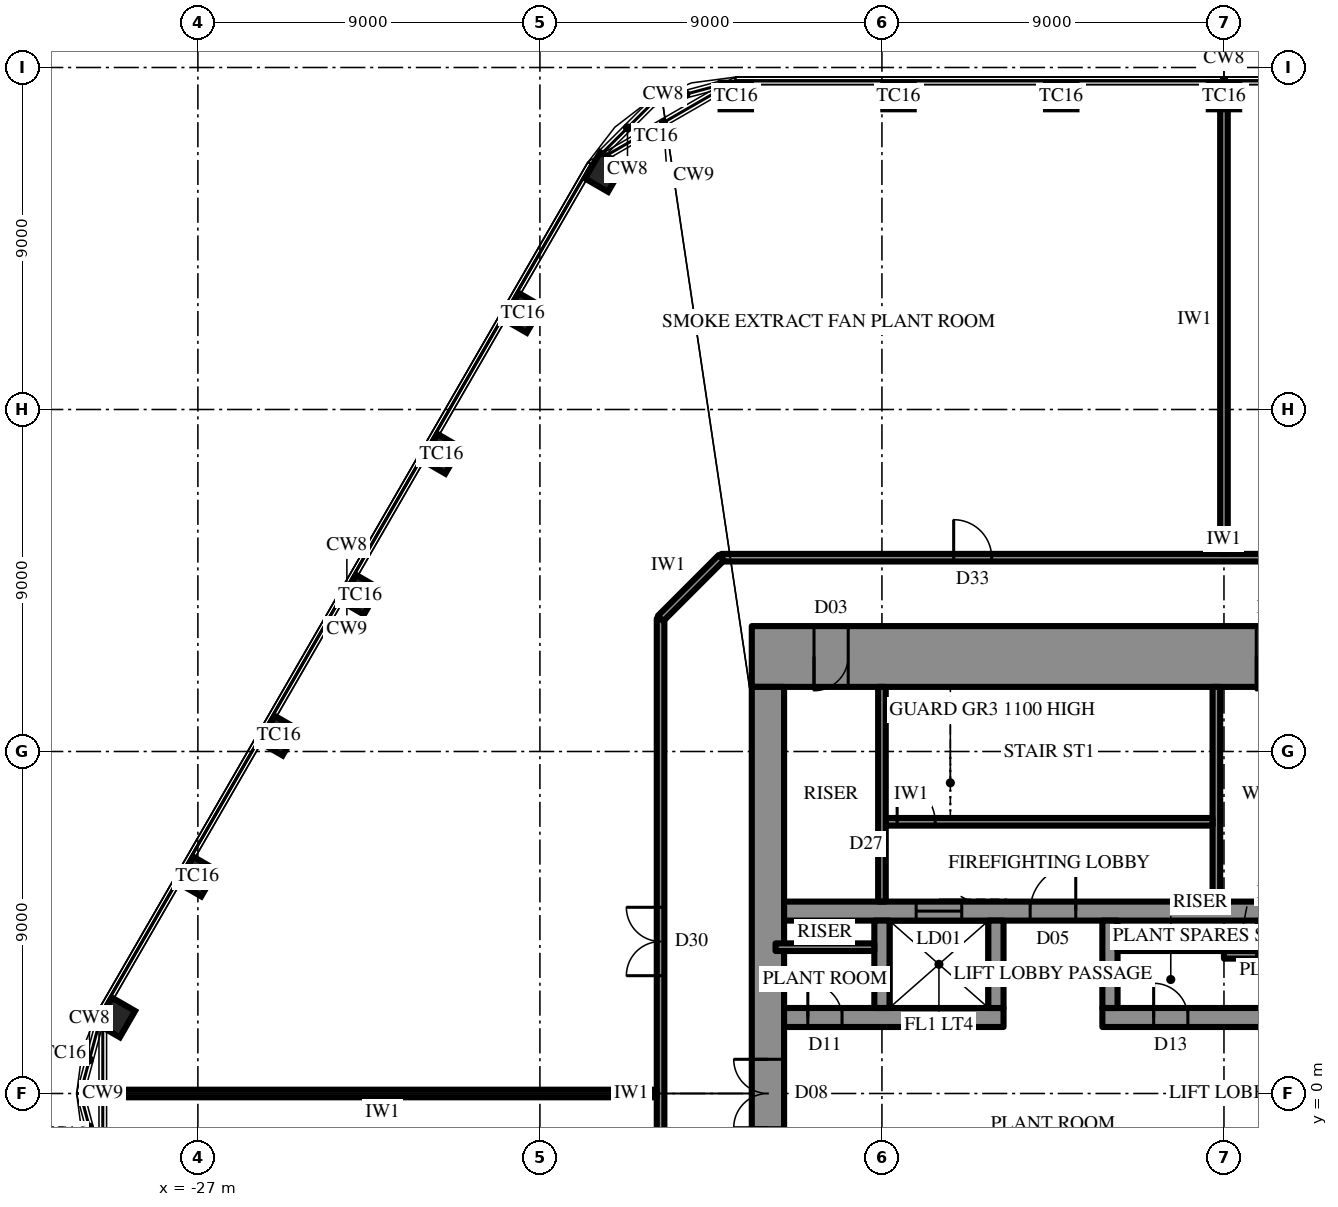
"""IFC4 building model, lengths in metres.
Left out: names, types, materials, properties, quantities, classifications, styles, units other than length and angle.
Written with IfcOpenShell. Run it as: python <this file> out.ifc"""

import sys

from ifc_helpers import new_model, si_unit, direction, frame, frame_2d, origin, origin_2d, place, context, subcontext, project, spatial, rectangle, extrude, element, fill, save


model = new_model("IFC4")
c1 = context("Model", 3, precision=1e-05, world=origin(), true_north=direction((0.0, 1.0)))
c2 = subcontext(c1, "Body", "Model", "MODEL_VIEW")
j1 = project(units=[si_unit("LENGTHUNIT", "METRE"), si_unit("PLANEANGLEUNIT", "RADIAN")], contexts=[c1])
p1 = place(None, origin())
s1 = spatial("IfcSite", under=j1, at=p1, CompositionType="ELEMENT")
p2 = place(p1, origin())
s2 = spatial("IfcBuilding", under=s1, at=p2, CompositionType="ELEMENT")
p3 = place(p2, frame((0.0, 0.0, 402.3)))
s3 = spatial("IfcBuildingStorey", under=s2, at=p3, CompositionType="ELEMENT", Elevation=402.3)
for number, where, z_axis, x_axis in (
    (1, (0.0, 26.25, 0.0), (0.0, 0.0, 1.0), (-1.0, 0.0, 0.0)),
    (2, (-4.282, 26.25, 0.0), (0.0, 0.0, 1.0), (-1.0, 0.0, 0.0)),
    (3, (-8.564, 26.25, 0.0), (0.0, 0.0, 1.0), (-1.0, 0.0, 0.0)),
    (4, (-12.846, 26.25, 0.0), (0.0, 0.0, 1.0), (-1.0, 0.0, 0.0)),
    (5, (-16.31, 24.25, 0.0), (0.0, 0.0, 1.0), (-0.5, -0.866, 0.0)),
    (6, (-18.451, 20.542, 0.0), (0.0, 0.0, 1.0), (-0.5, -0.866, 0.0)),
    (7, (-20.592, 16.833, 0.0), (0.0, 0.0, 1.0), (-0.5, -0.866, 0.0)),
    (8, (-22.733, 13.125, 0.0), (0.0, 0.0, 1.0), (-0.5, -0.866, 0.0)),
    (9, (-24.874, 9.417, 0.0), (0.0, 0.0, 1.0), (-0.5, -0.866, 0.0)),
    (10, (-27.015, 5.708, 0.0), (0.0, 0.0, 1.0), (-0.5, -0.866, 0.0)),
    (11, (-29.156, 2.0, 0.0), (0.0, 0.0, 1.0), (-0.5, -0.866, 0.0)),
):
    element("IfcColumn", number, at=place(p3, frame(where, z_axis=z_axis, x_axis=x_axis)), inside=s3, PredefinedType="COLUMN", context=c2, shape_type="SweptSolid", body=[
        extrude(rectangle(XDim=0.8, YDim=0.7, at=origin_2d()), origin(), (0.0, 0.0, 1.0), 6.0),
    ])
p4 = place(p3, frame((-12.425, 11.5, 0.0), z_axis=(0.0, 0.0, 1.0), x_axis=(1.0, 0.0, 0.0)))
e12 = element("IfcWall", 12, at=p4, inside=s3, PredefinedType="SHEAR", context=c2, shape_type="SweptSolid", body=[
    extrude(rectangle(XDim=24.85, YDim=1.6, at=frame_2d((12.425, 0.0))), origin(), (0.0, 0.0, 1.0), 6.0),
])
p5 = place(p4, frame((13.275, 0.0, 0.0)))
e13 = element("IfcOpeningElement", 13, at=p5, cuts=e12, PredefinedType="OPENING", context=c2, shape_type="SweptSolid", body=[
    extrude(rectangle(XDim=0.9, YDim=2.2, at=frame_2d((0.45, 1.1))), frame((0.0, 0.81, 0.0), z_axis=(0.0, -1.0, 0.0), x_axis=(1.0, 0.0, 0.0)), (0.0, 0.0, 1.0), 1.62),
])
p6 = place(p4, frame((16.275, 0.0, 0.0)))
e14 = element("IfcOpeningElement", 14, at=p6, cuts=e12, PredefinedType="OPENING", context=c2, shape_type="SweptSolid", body=[
    extrude(rectangle(XDim=0.9, YDim=2.2, at=frame_2d((0.45, 1.1))), frame((0.0, 0.81, 0.0), z_axis=(0.0, -1.0, 0.0), x_axis=(1.0, 0.0, 0.0)), (0.0, 0.0, 1.0), 1.62),
])
p7 = place(p4, frame((19.325, 0.0, 0.0)))
e15 = element("IfcOpeningElement", 15, at=p7, cuts=e12, PredefinedType="OPENING", context=c2, shape_type="SweptSolid", body=[
    extrude(rectangle(XDim=1.0, YDim=2.2, at=frame_2d((0.5, 1.1))), frame((0.0, 0.81, 0.0), z_axis=(0.0, -1.0, 0.0), x_axis=(1.0, 0.0, 0.0)), (0.0, 0.0, 1.0), 1.62),
])
p8 = place(p4, frame((1.637, 0.0, 0.0)))
e16 = element("IfcOpeningElement", 16, at=p8, cuts=e12, PredefinedType="OPENING", context=c2, shape_type="SweptSolid", body=[
    extrude(rectangle(XDim=0.9, YDim=2.2, at=frame_2d((0.45, 1.1))), frame((0.0, 0.81, 0.0), z_axis=(0.0, -1.0, 0.0), x_axis=(1.0, 0.0, 0.0)), (0.0, 0.0, 1.0), 1.62),
])
p9 = place(p4, frame((22.312, 0.0, 0.0)))
e17 = element("IfcOpeningElement", 17, at=p9, cuts=e12, PredefinedType="OPENING", context=c2, shape_type="SweptSolid", body=[
    extrude(rectangle(XDim=0.9, YDim=2.2, at=frame_2d((0.45, 1.1))), frame((0.0, 0.81, 0.0), z_axis=(0.0, -1.0, 0.0), x_axis=(1.0, 0.0, 0.0)), (0.0, 0.0, 1.0), 1.62),
])
p10 = place(p3, frame((-12.0, 10.7, 0.0), z_axis=(0.0, 0.0, 1.0), x_axis=(0.0, -1.0, 0.0)))
e18 = element("IfcWall", 18, at=p10, inside=s3, PredefinedType="SHEAR", context=c2, shape_type="SweptSolid", body=[
    extrude(rectangle(XDim=21.4, YDim=0.85, at=frame_2d((10.7, 0.0))), origin(), (0.0, 0.0, 1.0), 6.0),
])
p11 = place(p10, frame((9.8, 0.0, 0.0)))
e19 = element("IfcOpeningElement", 19, at=p11, cuts=e18, PredefinedType="OPENING", context=c2, shape_type="SweptSolid", body=[
    extrude(rectangle(XDim=1.8, YDim=2.4, at=frame_2d((0.9, 1.2))), frame((0.0, 0.435, 0.0), z_axis=(0.0, -1.0, 0.0), x_axis=(1.0, 0.0, 0.0)), (0.0, 0.0, 1.0), 0.87),
])
p12 = place(p3, frame((-11.575, 2.0, 0.0), z_axis=(0.0, 0.0, 1.0), x_axis=(1.0, 0.0, 0.0)))
e20 = element("IfcWall", 20, at=p12, inside=s3, PredefinedType="SHEAR", context=c2, shape_type="SweptSolid", body=[
    extrude(rectangle(XDim=5.775, YDim=0.5, at=frame_2d((2.887, 0.0))), origin(), (0.0, 0.0, 1.0), 6.0),
])
p13 = place(p12, frame((0.625, 0.0, 0.0)))
e21 = element("IfcOpeningElement", 21, at=p13, cuts=e20, PredefinedType="OPENING", context=c2, shape_type="SweptSolid", body=[
    extrude(rectangle(XDim=0.9, YDim=2.2, at=frame_2d((0.45, 1.1))), frame((0.0, 0.26, 0.0), z_axis=(0.0, -1.0, 0.0), x_axis=(1.0, 0.0, 0.0)), (0.0, 0.0, 1.0), 0.52),
])
p14 = place(p3, frame((-3.2, 2.0, 0.0), z_axis=(0.0, 0.0, 1.0), x_axis=(1.0, 0.0, 0.0)))
e22 = element("IfcWall", 22, at=p14, inside=s3, PredefinedType="SHEAR", context=c2, shape_type="SweptSolid", body=[
    extrude(rectangle(XDim=14.775, YDim=0.5, at=frame_2d((7.387, 0.0))), origin(), (0.0, 0.0, 1.0), 6.0),
])
p15 = place(p14, frame((1.35, 0.0, 0.0)))
e23 = element("IfcOpeningElement", 23, at=p15, cuts=e22, PredefinedType="OPENING", context=c2, shape_type="SweptSolid", body=[
    extrude(rectangle(XDim=0.9, YDim=2.2, at=frame_2d((0.45, 1.1))), frame((0.0, 0.26, 0.0), z_axis=(0.0, -1.0, 0.0), x_axis=(1.0, 0.0, 0.0)), (0.0, 0.0, 1.0), 0.52),
])
p16 = place(p14, frame((4.25, 0.0, 0.0)))
e24 = element("IfcOpeningElement", 24, at=p16, cuts=e22, PredefinedType="OPENING", context=c2, shape_type="SweptSolid", body=[
    extrude(rectangle(XDim=0.9, YDim=2.2, at=frame_2d((0.45, 1.1))), frame((0.0, 0.26, 0.0), z_axis=(0.0, -1.0, 0.0), x_axis=(1.0, 0.0, 0.0)), (0.0, 0.0, 1.0), 0.52),
])
p17 = place(p14, frame((7.25, 0.0, 0.0)))
e25 = element("IfcOpeningElement", 25, at=p17, cuts=e22, PredefinedType="OPENING", context=c2, shape_type="SweptSolid", body=[
    extrude(rectangle(XDim=0.9, YDim=2.2, at=frame_2d((0.45, 1.1))), frame((0.0, 0.26, 0.0), z_axis=(0.0, -1.0, 0.0), x_axis=(1.0, 0.0, 0.0)), (0.0, 0.0, 1.0), 0.52),
])
p18 = place(p14, frame((10.15, 0.0, 0.0)))
e26 = element("IfcOpeningElement", 26, at=p18, cuts=e22, PredefinedType="OPENING", context=c2, shape_type="SweptSolid", body=[
    extrude(rectangle(XDim=0.9, YDim=2.2, at=frame_2d((0.45, 1.1))), frame((0.0, 0.26, 0.0), z_axis=(0.0, -1.0, 0.0), x_axis=(1.0, 0.0, 0.0)), (0.0, 0.0, 1.0), 0.52),
])
p19 = place(p14, frame((13.25, 0.0, 0.0)))
e27 = element("IfcOpeningElement", 27, at=p19, cuts=e22, PredefinedType="OPENING", context=c2, shape_type="SweptSolid", body=[
    extrude(rectangle(XDim=0.9, YDim=2.2, at=frame_2d((0.45, 1.1))), frame((0.0, 0.26, 0.0), z_axis=(0.0, -1.0, 0.0), x_axis=(1.0, 0.0, 0.0)), (0.0, 0.0, 1.0), 0.52),
])
p20 = place(p3, frame((-11.575, 4.8, 0.0), z_axis=(0.0, 0.0, 1.0), x_axis=(1.0, 0.0, 0.0)))
e28 = element("IfcWall", 28, at=p20, inside=s3, PredefinedType="SHEAR", context=c2, shape_type="SweptSolid", body=[
    extrude(rectangle(XDim=23.15, YDim=0.5, at=frame_2d((11.575, 0.0))), origin(), (0.0, 0.0, 1.0), 6.0),
])
p21 = place(p20, frame((6.475, 0.0, 0.0)))
e29 = element("IfcOpeningElement", 29, at=p21, cuts=e28, PredefinedType="OPENING", context=c2, shape_type="SweptSolid", body=[
    extrude(rectangle(XDim=1.2, YDim=2.2, at=frame_2d((0.6, 1.1))), frame((0.0, 0.26, 0.0), z_axis=(0.0, -1.0, 0.0), x_axis=(1.0, 0.0, 0.0)), (0.0, 0.0, 1.0), 0.52),
])
p22 = place(p20, frame((3.475, 0.0, 0.0)))
e30 = element("IfcOpeningElement", 30, at=p22, cuts=e28, PredefinedType="OPENING", context=c2, shape_type="SweptSolid", body=[
    extrude(rectangle(XDim=1.2, YDim=2.2, at=frame_2d((0.6, 1.1))), frame((0.0, 0.26, 0.0), z_axis=(0.0, -1.0, 0.0), x_axis=(1.0, 0.0, 0.0)), (0.0, 0.0, 1.0), 0.52),
])
for number, where, z_axis, x_axis in (
    (31, (-9.0, 2.25, 0.0), (0.0, 0.0, 1.0), (0.0, 1.0, 0.0)),
    (32, (-6.0, 2.25, 0.0), (0.0, 0.0, 1.0), (0.0, 1.0, 0.0)),
    (33, (-3.0, 2.25, 0.0), (0.0, 0.0, 1.0), (0.0, 1.0, 0.0)),
):
    element("IfcWall", number, at=place(p3, frame(where, z_axis=z_axis, x_axis=x_axis)), inside=s3, PredefinedType="SHEAR", context=c2, shape_type="SweptSolid", body=[
        extrude(rectangle(XDim=2.3, YDim=0.4, at=frame_2d((1.15, 0.0))), origin(), (0.0, 0.0, 1.0), 6.0),
    ])
p23 = place(p3, frame((-0.2, 5.05, 0.0), z_axis=(0.0, 0.0, 1.0), x_axis=(0.0, 1.0, 0.0)))
e34 = element("IfcWall", 34, at=p23, inside=s3, PredefinedType="SHEAR", context=c2, shape_type="SweptSolid", body=[
    extrude(rectangle(XDim=5.65, YDim=0.2, at=frame_2d((2.825, 0.0))), origin(), (0.0, 0.0, 1.0), 6.0),
])
p24 = place(p3, frame((-8.9, 7.15, 0.0), z_axis=(0.0, 0.0, 1.0), x_axis=(1.0, 0.0, 0.0)))
e35 = element("IfcWall", 35, at=p24, inside=s3, PredefinedType="SHEAR", context=c2, shape_type="SweptSolid", body=[
    extrude(rectangle(XDim=8.6, YDim=0.2, at=frame_2d((4.3, 0.0))), origin(), (0.0, 0.0, 1.0), 6.0),
])
p25 = place(p24, frame((0.3, 0.0, 0.0)))
e36 = element("IfcOpeningElement", 36, at=p25, cuts=e35, PredefinedType="OPENING", context=c2, shape_type="SweptSolid", body=[
    extrude(rectangle(XDim=1.0, YDim=2.2, at=frame_2d((0.5, 1.1))), frame((0.0, 0.11, 0.0), z_axis=(0.0, -1.0, 0.0), x_axis=(1.0, 0.0, 0.0)), (0.0, 0.0, 1.0), 0.22),
])
p26 = place(p3, frame((-9.0, 5.05, 0.0), z_axis=(0.0, 0.0, 1.0), x_axis=(0.0, 1.0, 0.0)))
e37 = element("IfcWall", 37, at=p26, inside=s3, PredefinedType="PARTITIONING", context=c2, shape_type="SweptSolid", body=[
    extrude(rectangle(XDim=5.65, YDim=0.2, at=frame_2d((2.825, 0.0))), origin(), (0.0, 0.0, 1.0), 5.7),
])
p27 = place(p3, frame((-11.8, 3.85, 0.0), z_axis=(0.0, 0.0, 1.0), x_axis=(1.0, 0.0, 0.0)))
e38 = element("IfcWall", 38, at=p27, inside=s3, PredefinedType="PARTITIONING", context=c2, shape_type="SweptSolid", body=[
    extrude(rectangle(XDim=2.6, YDim=0.2, at=frame_2d((1.3, 0.0))), origin(), (0.0, 0.0, 1.0), 5.7),
])
p28 = place(p3, frame((-2.8, 3.85, 0.0), z_axis=(0.0, 0.0, 1.0), x_axis=(1.0, 0.0, 0.0)))
e39 = element("IfcWall", 39, at=p28, inside=s3, PredefinedType="PARTITIONING", context=c2, shape_type="SweptSolid", body=[
    extrude(rectangle(XDim=2.8, YDim=0.2, at=frame_2d((1.4, 0.0))), origin(), (0.0, 0.0, 1.0), 5.7),
])
p29 = place(p3, frame((0.0, 3.65, 0.0), z_axis=(0.0, 0.0, 1.0), x_axis=(1.0, 0.0, 0.0)))
e40 = element("IfcWall", 40, at=p29, inside=s3, PredefinedType="PARTITIONING", context=c2, shape_type="SweptSolid", body=[
    extrude(rectangle(XDim=1.0, YDim=0.2, at=frame_2d((0.5, 0.0))), origin(), (0.0, 0.0, 1.0), 5.7),
])
p30 = place(p3, frame((-13.225, 14.1, 0.0), z_axis=(0.0, 0.0, 1.0), x_axis=(1.0, 0.0, 0.0)))
e41 = element("IfcWall", 41, at=p30, inside=s3, PredefinedType="PARTITIONING", context=c2, shape_type="SweptSolid", body=[
    extrude(rectangle(XDim=26.45, YDim=0.2, at=frame_2d((13.225, 0.0))), origin(), (0.0, 0.0, 1.0), 5.7),
])
p31 = place(p30, frame((6.113, 0.0, 0.0)))
e42 = element("IfcOpeningElement", 42, at=p31, cuts=e41, PredefinedType="OPENING", context=c2, shape_type="SweptSolid", body=[
    extrude(rectangle(XDim=1.0, YDim=2.2, at=frame_2d((0.5, 1.1))), frame((0.0, 0.11, 0.0), z_axis=(0.0, -1.0, 0.0), x_axis=(1.0, 0.0, 0.0)), (0.0, 0.0, 1.0), 0.22),
])
p32 = place(p3, frame((-14.825, -12.5, 0.0), z_axis=(0.0, 0.0, 1.0), x_axis=(0.0, 1.0, 0.0)))
e43 = element("IfcWall", 43, at=p32, inside=s3, PredefinedType="PARTITIONING", context=c2, shape_type="SweptSolid", body=[
    extrude(rectangle(XDim=25.0, YDim=0.2, at=frame_2d((12.5, 0.0))), origin(), (0.0, 0.0, 1.0), 5.7),
])
p33 = place(p32, frame((15.6, 0.0, 0.0)))
e44 = element("IfcOpeningElement", 44, at=p33, cuts=e43, PredefinedType="OPENING", context=c2, shape_type="SweptSolid", body=[
    extrude(rectangle(XDim=1.8, YDim=2.4, at=frame_2d((0.9, 1.2))), frame((0.0, 0.11, 0.0), z_axis=(0.0, -1.0, 0.0), x_axis=(1.0, 0.0, 0.0)), (0.0, 0.0, 1.0), 0.22),
])
p34 = place(p32, frame((7.6, 0.0, 0.0)))
e45 = element("IfcOpeningElement", 45, at=p34, cuts=e43, PredefinedType="OPENING", context=c2, shape_type="SweptSolid", body=[
    extrude(rectangle(XDim=1.8, YDim=2.4, at=frame_2d((0.9, 1.2))), frame((0.0, 0.11, 0.0), z_axis=(0.0, -1.0, 0.0), x_axis=(1.0, 0.0, 0.0)), (0.0, 0.0, 1.0), 0.22),
])
p35 = place(p3, frame((-14.825, 12.5, 0.0), z_axis=(0.0, 0.0, 1.0), x_axis=(0.707052830339, 0.707160727918, 0.0)))
e46 = element("IfcWall", 46, at=p35, inside=s3, PredefinedType="PARTITIONING", context=c2, shape_type="SweptSolid", body=[
    extrude(rectangle(XDim=2.263, YDim=0.2, at=frame_2d((1.131, 0.0))), origin(), (0.0, 0.0, 1.0), 5.7),
])
p36 = place(p3, frame((0.0, 14.2, 0.0), z_axis=(0.0, 0.0, 1.0), x_axis=(0.0, 1.0, 0.0)))
e47 = element("IfcWall", 47, at=p36, inside=s3, PredefinedType="PARTITIONING", context=c2, shape_type="SweptSolid", body=[
    extrude(rectangle(XDim=12.36, YDim=0.2, at=frame_2d((6.18, 0.0))), origin(), (0.0, 0.0, 1.0), 4.692),
])
p37 = place(p3, frame((-14.925, 0.0, 0.0), z_axis=(0.0, 0.0, 1.0), x_axis=(-1.0, 0.0, 0.0)))
e48 = element("IfcWall", 48, at=p37, inside=s3, PredefinedType="PARTITIONING", context=c2, shape_type="SweptSolid", body=[
    extrude(rectangle(XDim=14.422, YDim=0.2, at=frame_2d((7.211, 0.0))), origin(), (0.0, 0.0, 1.0), 4.664),
])
p38 = place(p3, frame((-29.347, 0.0, 0.0), z_axis=(0.0, 0.0, 1.0), x_axis=(-1.0, 0.0, 0.0)))
e49 = element("IfcWall", 49, at=p38, inside=s3, PredefinedType="PARTITIONING", context=c2, shape_type="SweptSolid", body=[
    extrude(rectangle(XDim=0.657, YDim=0.2, at=frame_2d((0.328, 0.0))), origin(), (0.0, 0.0, 1.0), 5.7),
])
p39 = place(p11, frame((1.8, 0.0, 0.0), z_axis=(0.0, 0.0, 1.0), x_axis=(-1.0, 0.0, 0.0)))
e50 = element("IfcDoor", 50, at=p39, inside=s3, OperationType="DOUBLE_DOOR_SINGLE_SWING", PredefinedType="DOOR", context=c2, shape_type="SweptSolid", body=[
    extrude(rectangle(XDim=1.8, YDim=2.4, at=frame_2d((0.9, 1.2))), frame((0.0, 0.025, 0.0), z_axis=(0.0, -1.0, 0.0), x_axis=(1.0, 0.0, 0.0)), (0.0, 0.0, 1.0), 0.05),
])
fill(e19, e50)
p40 = place(p21, origin())
e51 = element("IfcDoor", 51, at=p40, inside=s3, OperationType="SINGLE_SWING_LEFT", PredefinedType="DOOR", context=c2, shape_type="SweptSolid", body=[
    extrude(rectangle(XDim=1.2, YDim=2.2, at=frame_2d((0.6, 1.1))), frame((0.0, 0.025, 0.0), z_axis=(0.0, -1.0, 0.0), x_axis=(1.0, 0.0, 0.0)), (0.0, 0.0, 1.0), 0.05),
])
fill(e29, e51)
p41 = place(p25, origin())
e52 = element("IfcDoor", 52, at=p41, inside=s3, OperationType="SINGLE_SWING_RIGHT", PredefinedType="DOOR", context=c2, shape_type="SweptSolid", body=[
    extrude(rectangle(XDim=1.0, YDim=2.2, at=frame_2d((0.5, 1.1))), frame((0.0, 0.025, 0.0), z_axis=(0.0, -1.0, 0.0), x_axis=(1.0, 0.0, 0.0)), (0.0, 0.0, 1.0), 0.05),
])
fill(e36, e52)
p42 = place(p5, frame((0.9, 0.0, 0.0), z_axis=(0.0, 0.0, 1.0), x_axis=(-1.0, 0.0, 0.0)))
e53 = element("IfcDoor", 53, at=p42, inside=s3, OperationType="SINGLE_SWING_LEFT", PredefinedType="DOOR", context=c2, shape_type="SweptSolid", body=[
    extrude(rectangle(XDim=0.9, YDim=2.2, at=frame_2d((0.45, 1.1))), frame((0.0, 0.025, 0.0), z_axis=(0.0, -1.0, 0.0), x_axis=(1.0, 0.0, 0.0)), (0.0, 0.0, 1.0), 0.05),
])
fill(e13, e53)
p43 = place(p8, frame((0.9, 0.0, 0.0), z_axis=(0.0, 0.0, 1.0), x_axis=(-1.0, 0.0, 0.0)))
e54 = element("IfcDoor", 54, at=p43, inside=s3, OperationType="SINGLE_SWING_LEFT", PredefinedType="DOOR", context=c2, shape_type="SweptSolid", body=[
    extrude(rectangle(XDim=0.9, YDim=2.2, at=frame_2d((0.45, 1.1))), frame((0.0, 0.025, 0.0), z_axis=(0.0, -1.0, 0.0), x_axis=(1.0, 0.0, 0.0)), (0.0, 0.0, 1.0), 0.05),
])
fill(e16, e54)
p44 = place(p13, origin())
e55 = element("IfcDoor", 55, at=p44, inside=s3, OperationType="SINGLE_SWING_RIGHT", PredefinedType="DOOR", context=c2, shape_type="SweptSolid", body=[
    extrude(rectangle(XDim=0.9, YDim=2.2, at=frame_2d((0.45, 1.1))), frame((0.0, 0.025, 0.0), z_axis=(0.0, -1.0, 0.0), x_axis=(1.0, 0.0, 0.0)), (0.0, 0.0, 1.0), 0.05),
])
fill(e21, e55)
p45 = place(p15, origin())
e56 = element("IfcDoor", 56, at=p45, inside=s3, OperationType="SINGLE_SWING_RIGHT", PredefinedType="DOOR", context=c2, shape_type="SweptSolid", body=[
    extrude(rectangle(XDim=0.9, YDim=2.2, at=frame_2d((0.45, 1.1))), frame((0.0, 0.025, 0.0), z_axis=(0.0, -1.0, 0.0), x_axis=(1.0, 0.0, 0.0)), (0.0, 0.0, 1.0), 0.05),
])
fill(e23, e56)
p46 = place(p22, origin())
e57 = element("IfcDoor", 57, at=p46, inside=s3, OperationType="SLIDING_TO_LEFT", PredefinedType="DOOR", context=c2, shape_type="SweptSolid", body=[
    extrude(rectangle(XDim=1.2, YDim=2.2, at=frame_2d((0.6, 1.1))), frame((0.0, 0.025, 0.0), z_axis=(0.0, -1.0, 0.0), x_axis=(1.0, 0.0, 0.0)), (0.0, 0.0, 1.0), 0.05),
])
fill(e30, e57)
p47 = place(p31, origin())
e58 = element("IfcDoor", 58, at=p47, inside=s3, OperationType="SINGLE_SWING_RIGHT", PredefinedType="DOOR", context=c2, shape_type="SweptSolid", body=[
    extrude(rectangle(XDim=1.0, YDim=2.2, at=frame_2d((0.5, 1.1))), frame((0.0, 0.025, 0.0), z_axis=(0.0, -1.0, 0.0), x_axis=(1.0, 0.0, 0.0)), (0.0, 0.0, 1.0), 0.05),
])
fill(e42, e58)
p48 = place(p33, origin())
e59 = element("IfcDoor", 59, at=p48, inside=s3, OperationType="DOUBLE_DOOR_SINGLE_SWING", PredefinedType="DOOR", context=c2, shape_type="SweptSolid", body=[
    extrude(rectangle(XDim=1.8, YDim=2.4, at=frame_2d((0.9, 1.2))), frame((0.0, 0.025, 0.0), z_axis=(0.0, -1.0, 0.0), x_axis=(1.0, 0.0, 0.0)), (0.0, 0.0, 1.0), 0.05),
])
fill(e44, e59)
save(model, sys.argv[1])
